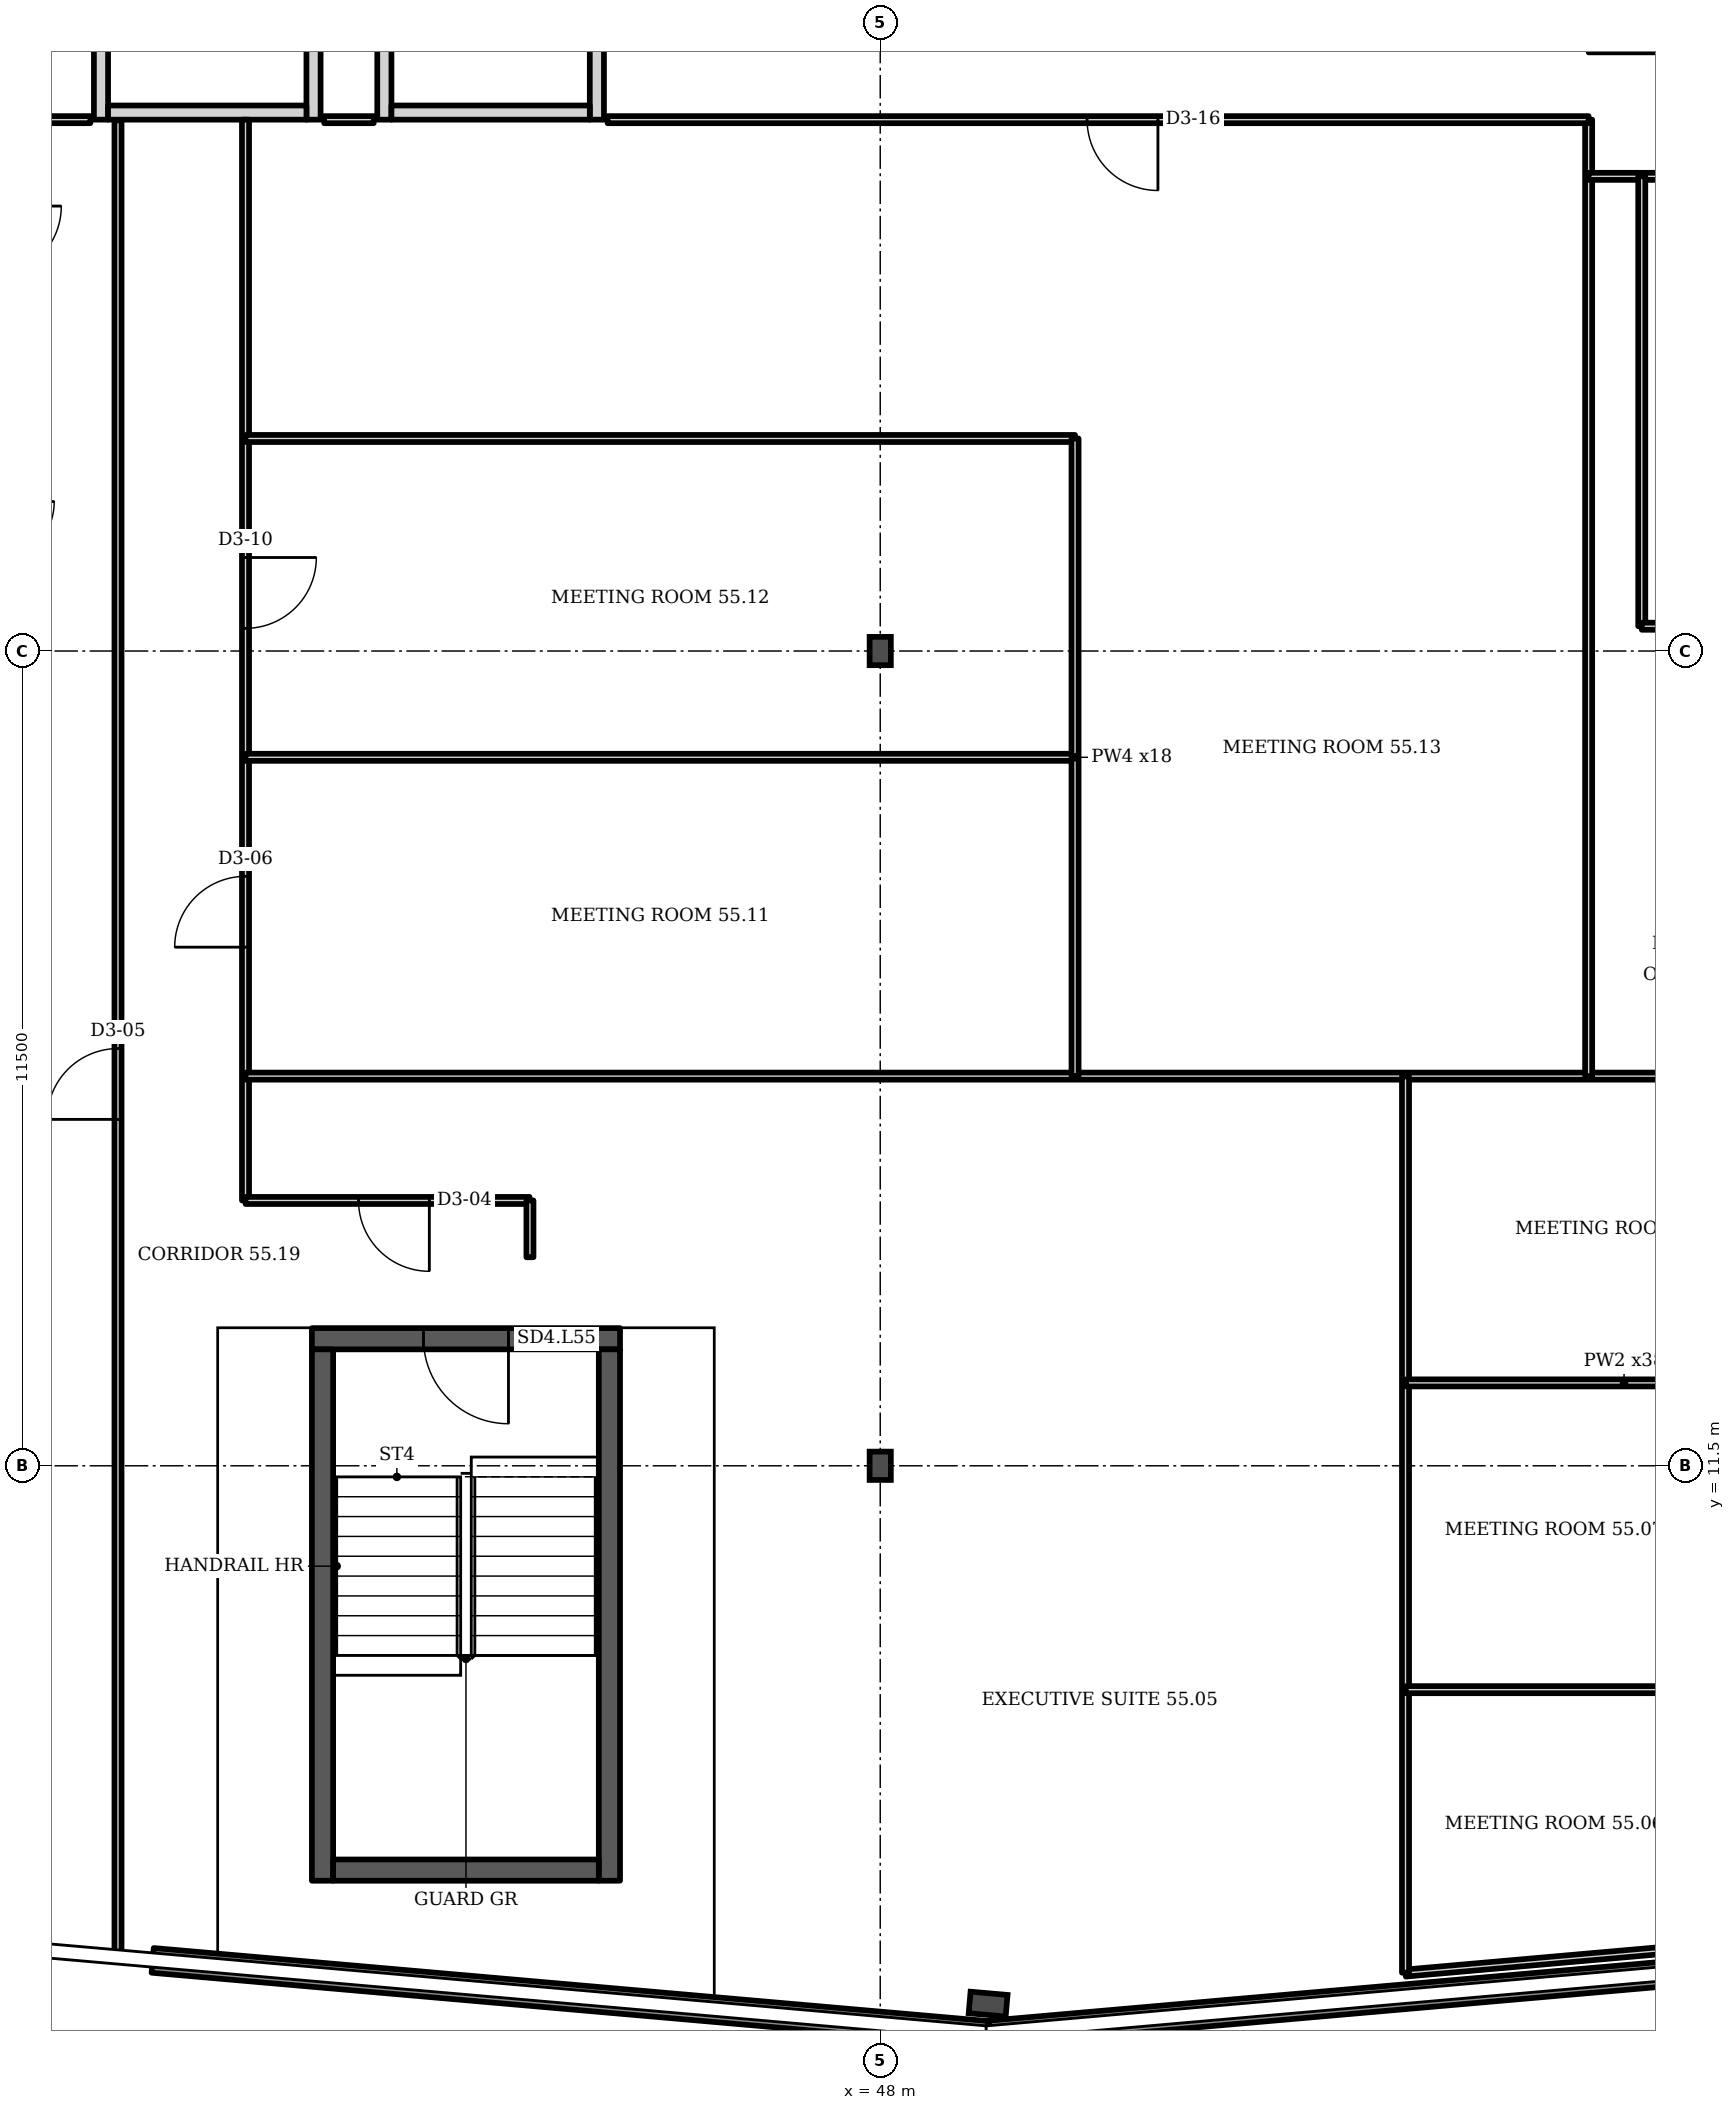
"""IFC4 building model, lengths in metres.
Left out: names, types, materials, properties, quantities, classifications, styles, units other than length and angle.
Written with IfcOpenShell. Run it as: python <this file> out.ifc"""

import sys

from ifc_helpers import new_model, si_unit, direction, frame, frame_2d, origin, origin_2d, place, context, subcontext, project, spatial, rectangle, i_section, extrude, element, fill, save


model = new_model("IFC4")
c1 = context("Model", 3, precision=1e-05, world=origin(), true_north=direction((0.0, 1.0)))
c2 = subcontext(c1, "Body", "Model", "MODEL_VIEW")
j1 = project(units=[si_unit("LENGTHUNIT", "METRE"), si_unit("PLANEANGLEUNIT", "RADIAN")], contexts=[c1])
p1 = place(None, origin())
s1 = spatial("IfcSite", under=j1, at=p1, CompositionType="ELEMENT")
p2 = place(p1, origin())
s2 = spatial("IfcBuilding", under=s1, at=p2, CompositionType="ELEMENT")
p3 = place(p2, frame((0.0, 0.0, 221.5)))
s3 = spatial("IfcBuildingStorey", under=s2, at=p3, CompositionType="ELEMENT", Elevation=221.5)
p4 = place(p3, frame((49.523, 3.902, 0.0), z_axis=(0.0, 0.0, 1.0), x_axis=(-0.087156, -0.996197, 0.0)))
e1 = element("IfcColumn", 1, at=p4, inside=s3, PredefinedType="COLUMN", context=c2, shape_type="SweptSolid", body=[
    extrude(i_section(OverallWidth=0.306, OverallDepth=0.524, WebThickness=0.021, FlangeThickness=0.04, FilletRadius=0.027, at=origin_2d()), origin(), (0.0, 0.0, 1.0), 3.6),
])
for number, where, z_axis, x_axis in (
    (2, (48.0, 11.5, 0.0), (0.0, 0.0, 1.0), (1.0, 0.0, 0.0)),
    (3, (48.0, 23.0, 0.0), (0.0, 0.0, 1.0), (1.0, 0.0, 0.0)),
):
    element("IfcColumn", number, at=place(p3, frame(where, z_axis=z_axis, x_axis=x_axis)), inside=s3, PredefinedType="COLUMN", context=c2, shape_type="SweptSolid", body=[
        extrude(i_section(OverallWidth=0.3, OverallDepth=0.4, WebThickness=0.013, FlangeThickness=0.024, FilletRadius=0.027, at=origin_2d()), origin(), (0.0, 0.0, 1.0), 3.6),
    ])
p5 = place(p3, frame((37.729, 4.519, 0.0), z_axis=(0.0, 0.0, 1.0), x_axis=(0.99619, -0.087167, 0.0)))
e4 = element("IfcWall", 4, at=p5, inside=s3, PredefinedType="SOLIDWALL", context=c2, shape_type="SweptSolid", body=[
    extrude(rectangle(XDim=11.831, YDim=0.35, at=frame_2d((5.915, 0.0))), origin(), (0.0, 0.0, 1.0), 1.0),
])
p6 = place(p3, frame((49.545, 3.493, 0.0), z_axis=(0.0, 0.0, 1.0), x_axis=(0.996196, 0.087141, 0.0)))
e5 = element("IfcWall", 5, at=p6, inside=s3, PredefinedType="SOLIDWALL", context=c2, shape_type="SweptSolid", body=[
    extrude(rectangle(XDim=11.803, YDim=0.35, at=frame_2d((5.902, 0.0))), origin(), (0.0, 0.0, 1.0), 1.0),
])
p7 = place(p3, frame((37.0, 30.5, 0.0), z_axis=(0.0, 0.0, 1.0), x_axis=(0.0, 1.0, 0.0)))
e6 = element("IfcWall", 6, at=p7, inside=s3, PredefinedType="PARTITIONING", context=c2, shape_type="SweptSolid", body=[
    extrude(rectangle(XDim=3.5, YDim=0.2, at=frame_2d((1.75, 0.0))), origin(), (0.0, 0.0, 1.0), 3.2),
])
p8 = place(p7, frame((1.2, 0.0, 0.0)))
e7 = element("IfcOpeningElement", 7, at=p8, cuts=e6, PredefinedType="OPENING", context=c2, shape_type="SweptSolid", body=[
    extrude(rectangle(XDim=1.1, YDim=2.1, at=frame_2d((0.55, 1.05))), frame((0.0, 0.11, 0.0), z_axis=(0.0, -1.0, 0.0), x_axis=(1.0, 0.0, 0.0)), (0.0, 0.0, 1.0), 0.22),
])
p9 = place(p3, frame((40.0, 30.5, 0.0), z_axis=(0.0, 0.0, 1.0), x_axis=(0.0, 1.0, 0.0)))
e8 = element("IfcWall", 8, at=p9, inside=s3, PredefinedType="PARTITIONING", context=c2, shape_type="SweptSolid", body=[
    extrude(rectangle(XDim=3.5, YDim=0.2, at=frame_2d((1.75, 0.0))), origin(), (0.0, 0.0, 1.0), 3.2),
])
p10 = place(p3, frame((37.1, 30.6, 0.0), z_axis=(0.0, 0.0, 1.0), x_axis=(1.0, 0.0, 0.0)))
e9 = element("IfcWall", 9, at=p10, inside=s3, PredefinedType="PARTITIONING", context=c2, shape_type="SweptSolid", body=[
    extrude(rectangle(XDim=2.8, YDim=0.2, at=frame_2d((1.4, 0.0))), origin(), (0.0, 0.0, 1.0), 3.2),
])
p11 = place(p3, frame((41.0, 30.5, 0.0), z_axis=(0.0, 0.0, 1.0), x_axis=(0.0, 1.0, 0.0)))
e10 = element("IfcWall", 10, at=p11, inside=s3, PredefinedType="PARTITIONING", context=c2, shape_type="SweptSolid", body=[
    extrude(rectangle(XDim=3.5, YDim=0.2, at=frame_2d((1.75, 0.0))), origin(), (0.0, 0.0, 1.0), 3.2),
])
p12 = place(p3, frame((44.0, 30.5, 0.0), z_axis=(0.0, 0.0, 1.0), x_axis=(0.0, 1.0, 0.0)))
e11 = element("IfcWall", 11, at=p12, inside=s3, PredefinedType="PARTITIONING", context=c2, shape_type="SweptSolid", body=[
    extrude(rectangle(XDim=3.5, YDim=0.2, at=frame_2d((1.75, 0.0))), origin(), (0.0, 0.0, 1.0), 3.2),
])
p13 = place(p12, frame((1.2, 0.0, 0.0)))
e12 = element("IfcOpeningElement", 12, at=p13, cuts=e11, PredefinedType="OPENING", context=c2, shape_type="SweptSolid", body=[
    extrude(rectangle(XDim=1.1, YDim=2.1, at=frame_2d((0.55, 1.05))), frame((0.0, 0.11, 0.0), z_axis=(0.0, -1.0, 0.0), x_axis=(1.0, 0.0, 0.0)), (0.0, 0.0, 1.0), 0.22),
])
p14 = place(p3, frame((41.1, 30.6, 0.0), z_axis=(0.0, 0.0, 1.0), x_axis=(1.0, 0.0, 0.0)))
e13 = element("IfcWall", 13, at=p14, inside=s3, PredefinedType="PARTITIONING", context=c2, shape_type="SweptSolid", body=[
    extrude(rectangle(XDim=2.8, YDim=0.2, at=frame_2d((1.4, 0.0))), origin(), (0.0, 0.0, 1.0), 3.2),
])
p15 = place(p3, frame((39.977, 13.293, 0.0), z_axis=(0.0, 0.0, 1.0), x_axis=(1.0, 0.0, 0.0)))
e14 = element("IfcWall", 14, at=p15, inside=s3, PredefinedType="SHEAR", context=c2, shape_type="SweptSolid", body=[
    extrude(rectangle(XDim=4.35, YDim=0.3, at=frame_2d((2.175, 0.0))), origin(), (0.0, 0.0, 1.0), 3.2),
])
p16 = place(p15, frame((1.575, 0.0, 0.0)))
e15 = element("IfcOpeningElement", 15, at=p16, cuts=e14, PredefinedType="OPENING", context=c2, shape_type="SweptSolid", body=[
    extrude(rectangle(XDim=1.2, YDim=2.1, at=frame_2d((0.6, 1.05))), frame((0.0, 0.16, 0.0), z_axis=(0.0, -1.0, 0.0), x_axis=(1.0, 0.0, 0.0)), (0.0, 0.0, 1.0), 0.32),
])
p17 = place(p3, frame((24.8, 30.5, 0.0), z_axis=(0.0, 0.0, 1.0), x_axis=(1.0, 0.0, 0.0)))
e16 = element("IfcWall", 16, at=p17, inside=s3, PredefinedType="PARTITIONING", context=c2, shape_type="SweptSolid", body=[
    extrude(rectangle(XDim=12.05, YDim=0.1, at=frame_2d((6.025, 0.0))), origin(), (0.0, 0.0, 1.0), 3.2),
])
p18 = place(p3, frame((37.24, 4.587, 0.0), z_axis=(0.0, 0.0, 1.0), x_axis=(0.0, 1.0, 0.0)))
e17 = element("IfcWall", 17, at=p18, inside=s3, PredefinedType="PARTITIONING", context=c2, shape_type="SweptSolid", body=[
    extrude(rectangle(XDim=25.903, YDim=0.1, at=frame_2d((12.952, 0.0))), origin(), (0.0, 0.0, 1.0), 2.58),
])
p19 = place(p18, frame((11.802, 0.0, 0.0)))
e18 = element("IfcOpeningElement", 18, at=p19, cuts=e17, PredefinedType="OPENING", context=c2, shape_type="SweptSolid", body=[
    extrude(rectangle(XDim=1.0, YDim=2.1, at=frame_2d((0.5, 1.05))), frame((0.0, 0.06, 0.0), z_axis=(0.0, -1.0, 0.0), x_axis=(1.0, 0.0, 0.0)), (0.0, 0.0, 1.0), 0.12),
])
p20 = place(p3, frame((39.04, 15.245, 0.0), z_axis=(0.0, 0.0, 1.0), x_axis=(0.0, 1.0, 0.0)))
e19 = element("IfcWall", 19, at=p20, inside=s3, PredefinedType="PARTITIONING", context=c2, shape_type="SweptSolid", body=[
    extrude(rectangle(XDim=15.255, YDim=0.1, at=frame_2d((7.627, 0.0))), origin(), (0.0, 0.0, 1.0), 3.2),
])
p21 = place(p20, frame((3.575, 0.0, 0.0)))
e20 = element("IfcOpeningElement", 20, at=p21, cuts=e19, PredefinedType="OPENING", context=c2, shape_type="SweptSolid", body=[
    extrude(rectangle(XDim=1.0, YDim=2.1, at=frame_2d((0.5, 1.05))), frame((0.0, 0.06, 0.0), z_axis=(0.0, -1.0, 0.0), x_axis=(1.0, 0.0, 0.0)), (0.0, 0.0, 1.0), 0.12),
])
p22 = place(p20, frame((8.075, 0.0, 0.0)))
e21 = element("IfcOpeningElement", 21, at=p22, cuts=e19, PredefinedType="OPENING", context=c2, shape_type="SweptSolid", body=[
    extrude(rectangle(XDim=1.0, YDim=2.1, at=frame_2d((0.5, 1.05))), frame((0.0, 0.06, 0.0), z_axis=(0.0, -1.0, 0.0), x_axis=(1.0, 0.0, 0.0)), (0.0, 0.0, 1.0), 0.12),
])
p23 = place(p3, frame((39.04, 15.245, 0.0), z_axis=(0.0, 0.0, 1.0), x_axis=(1.0, 0.0, 0.0)))
e22 = element("IfcWall", 22, at=p23, inside=s3, PredefinedType="PARTITIONING", context=c2, shape_type="SweptSolid", body=[
    extrude(rectangle(XDim=4.01, YDim=0.1, at=frame_2d((2.005, 0.0))), origin(), (0.0, 0.0, 1.0), 3.2),
])
p24 = place(p23, frame((1.595, 0.0, 0.0)))
e23 = element("IfcOpeningElement", 23, at=p24, cuts=e22, PredefinedType="OPENING", context=c2, shape_type="SweptSolid", body=[
    extrude(rectangle(XDim=1.0, YDim=2.1, at=frame_2d((0.5, 1.05))), frame((0.0, 0.06, 0.0), z_axis=(0.0, -1.0, 0.0), x_axis=(1.0, 0.0, 0.0)), (0.0, 0.0, 1.0), 0.12),
])
p25 = place(p3, frame((39.04, 17.0, 0.0), z_axis=(0.0, 0.0, 1.0), x_axis=(1.0, 0.0, 0.0)))
e24 = element("IfcWall", 24, at=p25, inside=s3, PredefinedType="PARTITIONING", context=c2, shape_type="SweptSolid", body=[
    extrude(rectangle(XDim=22.54, YDim=0.1, at=frame_2d((11.27, 0.0))), origin(), (0.0, 0.0, 1.0), 3.2),
])
for number, where, z_axis, x_axis in (
    (25, (39.04, 21.5, 0.0), (0.0, 0.0, 1.0), (1.0, 0.0, 0.0)),
    (26, (39.04, 26.0, 0.0), (0.0, 0.0, 1.0), (1.0, 0.0, 0.0)),
):
    element("IfcWall", number, at=place(p3, frame(where, z_axis=z_axis, x_axis=x_axis)), inside=s3, PredefinedType="PARTITIONING", context=c2, shape_type="SweptSolid", body=[
        extrude(rectangle(XDim=11.71, YDim=0.1, at=frame_2d((5.855, 0.0))), origin(), (0.0, 0.0, 1.0), 3.2),
    ])
p26 = place(p3, frame((40.15, 30.5, 0.0), z_axis=(0.0, 0.0, 1.0), x_axis=(1.0, 0.0, 0.0)))
e27 = element("IfcWall", 27, at=p26, inside=s3, PredefinedType="PARTITIONING", context=c2, shape_type="SweptSolid", body=[
    extrude(rectangle(XDim=0.7, YDim=0.1, at=frame_2d((0.35, 0.0))), origin(), (0.0, 0.0, 1.0), 3.2),
])
p27 = place(p3, frame((43.055, 14.443, 0.0), z_axis=(0.0, 0.0, 1.0), x_axis=(0.0, 1.0, 0.0)))
e28 = element("IfcWall", 28, at=p27, inside=s3, PredefinedType="PARTITIONING", context=c2, shape_type="SweptSolid", body=[
    extrude(rectangle(XDim=0.802, YDim=0.1, at=frame_2d((0.401, 0.0))), origin(), (0.0, 0.0, 1.0), 3.2),
])
p28 = place(p3, frame((50.75, 17.0, 0.0), z_axis=(0.0, 0.0, 1.0), x_axis=(0.0, 1.0, 0.0)))
e29 = element("IfcWall", 29, at=p28, inside=s3, PredefinedType="PARTITIONING", context=c2, shape_type="SweptSolid", body=[
    extrude(rectangle(XDim=9.0, YDim=0.1, at=frame_2d((4.5, 0.0))), origin(), (0.0, 0.0, 1.0), 3.2),
])
p29 = place(p3, frame((55.415, 4.34, 0.0), z_axis=(0.0, 0.0, 1.0), x_axis=(0.996159, 0.087534, 0.0)))
e30 = element("IfcWall", 30, at=p29, inside=s3, PredefinedType="PARTITIONING", context=c2, shape_type="SweptSolid", body=[
    extrude(rectangle(XDim=5.31, YDim=0.1, at=frame_2d((2.655, 0.0))), origin(), (0.0, 0.0, 1.0), 2.58),
])
p30 = place(p3, frame((55.415, 4.345, 0.0), z_axis=(0.0, 0.0, 1.0), x_axis=(0.0, 1.0, 0.0)))
e31 = element("IfcWall", 31, at=p30, inside=s3, PredefinedType="PARTITIONING", context=c2, shape_type="SweptSolid", body=[
    extrude(rectangle(XDim=12.65, YDim=0.1, at=frame_2d((6.325, 0.0))), origin(), (0.0, 0.0, 1.0), 3.2),
])
for number, where, z_axis, x_axis in (
    (32, (55.42, 8.34, 0.0), (0.0, 0.0, 1.0), (1.0, 0.0, 0.0)),
    (33, (55.42, 12.67, 0.0), (0.0, 0.0, 1.0), (1.0, 0.0, 0.0)),
):
    element("IfcWall", number, at=place(p3, frame(where, z_axis=z_axis, x_axis=x_axis)), inside=s3, PredefinedType="PARTITIONING", context=c2, shape_type="SweptSolid", body=[
        extrude(rectangle(XDim=6.16, YDim=0.1, at=frame_2d((3.08, 0.0))), origin(), (0.0, 0.0, 1.0), 3.2),
    ])
p31 = place(p3, frame((58.0, 17.0, 0.0), z_axis=(0.0, 0.0, 1.0), x_axis=(0.0, 1.0, 0.0)))
e34 = element("IfcWall", 34, at=p31, inside=s3, PredefinedType="PARTITIONING", context=c2, shape_type="SweptSolid", body=[
    extrude(rectangle(XDim=13.5, YDim=0.1, at=frame_2d((6.75, 0.0))), origin(), (0.0, 0.0, 1.0), 3.2),
])
p32 = place(p3, frame((58.0, 29.7, 0.0), z_axis=(0.0, 0.0, 1.0), x_axis=(1.0, 0.0, 0.0)))
e35 = element("IfcWall", 35, at=p32, inside=s3, PredefinedType="PARTITIONING", context=c2, shape_type="SweptSolid", body=[
    extrude(rectangle(XDim=3.58, YDim=0.1, at=frame_2d((1.79, 0.0))), origin(), (0.0, 0.0, 1.0), 3.2),
])
p33 = place(p3, frame((58.75, 23.35, 0.0), z_axis=(0.0, 0.0, 1.0), x_axis=(0.0, 1.0, 0.0)))
e36 = element("IfcWall", 36, at=p33, inside=s3, PredefinedType="PARTITIONING", context=c2, shape_type="SweptSolid", body=[
    extrude(rectangle(XDim=6.35, YDim=0.1, at=frame_2d((3.175, 0.0))), origin(), (0.0, 0.0, 1.0), 3.2),
])
p34 = place(p3, frame((58.75, 23.35, 0.0), z_axis=(0.0, 0.0, 1.0), x_axis=(1.0, 0.0, 0.0)))
e37 = element("IfcWall", 37, at=p34, inside=s3, PredefinedType="PARTITIONING", context=c2, shape_type="SweptSolid", body=[
    extrude(rectangle(XDim=2.83, YDim=0.1, at=frame_2d((1.415, 0.0))), origin(), (0.0, 0.0, 1.0), 3.2),
])
p35 = place(p3, frame((44.15, 30.5, 0.0), z_axis=(0.0, 0.0, 1.0), x_axis=(1.0, 0.0, 0.0)))
e38 = element("IfcWall", 38, at=p35, inside=s3, PredefinedType="PARTITIONING", context=c2, shape_type="SweptSolid", body=[
    extrude(rectangle(XDim=13.85, YDim=0.1, at=frame_2d((6.925, 0.0))), origin(), (0.0, 0.0, 1.0), 3.2),
])
p36 = place(p35, frame((6.77, 0.0, 0.0)))
e39 = element("IfcOpeningElement", 39, at=p36, cuts=e38, PredefinedType="OPENING", context=c2, shape_type="SweptSolid", body=[
    extrude(rectangle(XDim=1.0, YDim=2.1, at=frame_2d((0.5, 1.05))), frame((0.0, 0.06, 0.0), z_axis=(0.0, -1.0, 0.0), x_axis=(1.0, 0.0, 0.0)), (0.0, 0.0, 1.0), 0.12),
])
for number, where, z_axis, x_axis in (
    (40, (40.127, 5.643, 0.0), (0.0, 0.0, 1.0), (0.0, 1.0, 0.0)),
    (41, (44.177, 5.643, 0.0), (0.0, 0.0, 1.0), (0.0, 1.0, 0.0)),
):
    element("IfcWall", number, at=place(p3, frame(where, z_axis=z_axis, x_axis=x_axis)), inside=s3, PredefinedType="SHEAR", context=c2, shape_type="SweptSolid", body=[
        extrude(rectangle(XDim=7.5, YDim=0.3, at=frame_2d((3.75, 0.0))), origin(), (0.0, 0.0, 1.0), 3.2),
    ])
p37 = place(p3, frame((40.277, 5.793, 0.0), z_axis=(0.0, 0.0, 1.0), x_axis=(1.0, 0.0, 0.0)))
e42 = element("IfcWall", 42, at=p37, inside=s3, PredefinedType="SHEAR", context=c2, shape_type="SweptSolid", body=[
    extrude(rectangle(XDim=3.75, YDim=0.3, at=frame_2d((1.875, 0.0))), origin(), (0.0, 0.0, 1.0), 3.2),
])
p38 = place(p16, origin())
e43 = element("IfcDoor", 43, at=p38, inside=s3, OperationType="SINGLE_SWING_RIGHT", PredefinedType="DOOR", context=c2, shape_type="SweptSolid", body=[
    extrude(rectangle(XDim=1.2, YDim=2.1, at=frame_2d((0.6, 1.05))), frame((0.0, 0.025, 0.0), z_axis=(0.0, -1.0, 0.0), x_axis=(1.0, 0.0, 0.0)), (0.0, 0.0, 1.0), 0.05),
])
fill(e15, e43)
p39 = place(p24, origin())
e44 = element("IfcDoor", 44, at=p39, inside=s3, OperationType="SINGLE_SWING_RIGHT", PredefinedType="DOOR", context=c2, shape_type="SweptSolid", body=[
    extrude(rectangle(XDim=1.0, YDim=2.1, at=frame_2d((0.5, 1.05))), frame((0.0, 0.025, 0.0), z_axis=(0.0, -1.0, 0.0), x_axis=(1.0, 0.0, 0.0)), (0.0, 0.0, 1.0), 0.05),
])
fill(e23, e44)
p40 = place(p19, origin())
e45 = element("IfcDoor", 45, at=p40, inside=s3, OperationType="SINGLE_SWING_LEFT", PredefinedType="DOOR", context=c2, shape_type="SweptSolid", body=[
    extrude(rectangle(XDim=1.0, YDim=2.1, at=frame_2d((0.5, 1.05))), frame((0.0, 0.025, 0.0), z_axis=(0.0, -1.0, 0.0), x_axis=(1.0, 0.0, 0.0)), (0.0, 0.0, 1.0), 0.05),
])
fill(e18, e45)
p41 = place(p21, origin())
e46 = element("IfcDoor", 46, at=p41, inside=s3, OperationType="SINGLE_SWING_LEFT", PredefinedType="DOOR", context=c2, shape_type="SweptSolid", body=[
    extrude(rectangle(XDim=1.0, YDim=2.1, at=frame_2d((0.5, 1.05))), frame((0.0, 0.025, 0.0), z_axis=(0.0, -1.0, 0.0), x_axis=(1.0, 0.0, 0.0)), (0.0, 0.0, 1.0), 0.05),
])
fill(e20, e46)
p42 = place(p22, origin())
e47 = element("IfcDoor", 47, at=p42, inside=s3, OperationType="SINGLE_SWING_RIGHT", PredefinedType="DOOR", context=c2, shape_type="SweptSolid", body=[
    extrude(rectangle(XDim=1.0, YDim=2.1, at=frame_2d((0.5, 1.05))), frame((0.0, 0.025, 0.0), z_axis=(0.0, -1.0, 0.0), x_axis=(1.0, 0.0, 0.0)), (0.0, 0.0, 1.0), 0.05),
])
fill(e21, e47)
p43 = place(p36, origin())
e48 = element("IfcDoor", 48, at=p43, inside=s3, OperationType="SINGLE_SWING_RIGHT", PredefinedType="DOOR", context=c2, shape_type="SweptSolid", body=[
    extrude(rectangle(XDim=1.0, YDim=2.1, at=frame_2d((0.5, 1.05))), frame((0.0, 0.025, 0.0), z_axis=(0.0, -1.0, 0.0), x_axis=(1.0, 0.0, 0.0)), (0.0, 0.0, 1.0), 0.05),
])
fill(e39, e48)
save(model, sys.argv[1])
